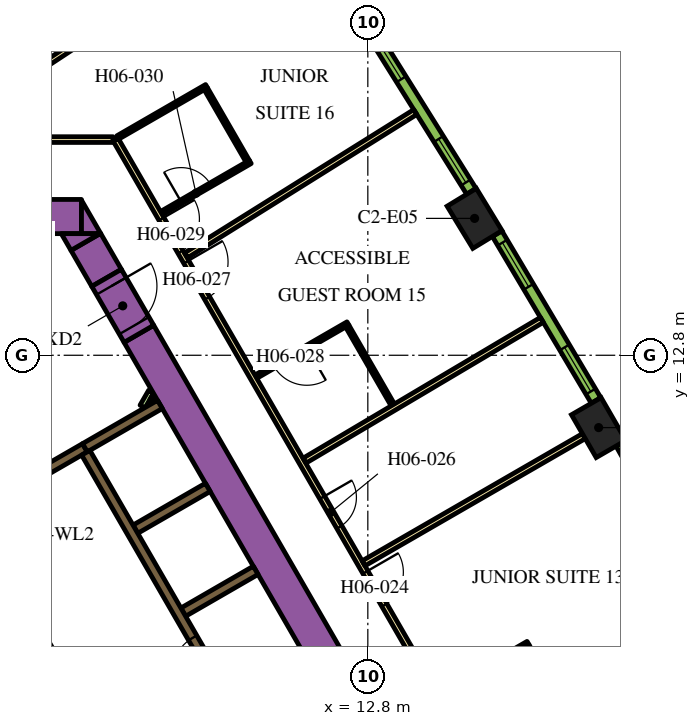
"""IFC4 building model, lengths in metres.
Left out: names, types, materials, properties, quantities, classifications, styles, units other than length and angle.
Written with IfcOpenShell. Run it as: python <this file> out.ifc"""

import sys

from ifc_helpers import new_model, si_unit, direction, frame, frame_2d, origin, origin_2d, place, context, subcontext, project, spatial, polyline, rectangle, outline, extrude, element, fill, save


model = new_model("IFC4")
c1 = context("Model", 3, precision=1e-05, world=origin(), true_north=direction((0.0, 1.0)))
c2 = subcontext(c1, "Body", "Model", "MODEL_VIEW")
j1 = project(units=[si_unit("LENGTHUNIT", "METRE"), si_unit("PLANEANGLEUNIT", "RADIAN")], contexts=[c1])
p1 = place(None, origin())
s1 = spatial("IfcSite", under=j1, at=p1, CompositionType="ELEMENT")
p2 = place(p1, origin())
s2 = spatial("IfcBuilding", under=s1, at=p2, CompositionType="ELEMENT")
p3 = place(p2, frame((0.0, 0.0, 91.5)))
s3 = spatial("IfcBuildingStorey", under=s2, at=p3, CompositionType="ELEMENT", Elevation=91.5)
for number, where, z_axis, x_axis in (
    (1, (18.874, 10.897, 0.0), (0.0, 0.0, 1.0), (-0.5, 0.866, 0.0)),
    (2, (15.609, 16.402, 0.0), (0.0, 0.0, 1.0), (-0.52, 0.854, 0.0)),
):
    element("IfcColumn", number, at=place(p3, frame(where, z_axis=z_axis, x_axis=x_axis)), inside=s3, PredefinedType="COLUMN", context=c2, shape_type="SweptSolid", body=[
        extrude(rectangle(XDim=1.3, YDim=0.9, at=origin_2d()), origin(), (0.0, 0.0, 1.0), 3.9),
    ])
p4 = place(p3, frame((6.776, 13.364, 0.0), z_axis=(0.0, 0.0, 1.0), x_axis=(0.500004177138, -0.8660229921, 0.0)))
e3 = element("IfcWall", 3, at=p4, inside=s3, PredefinedType="SOLIDWALL", context=c2, shape_type="SweptSolid", body=[
    extrude(rectangle(XDim=20.204, YDim=0.9, at=frame_2d((10.102, 0.0))), origin(), (0.0, 0.0, 1.0), 3.9),
])
p5 = place(p3, frame((-4.224, 16.45, 0.0), z_axis=(0.0, 0.0, 1.0), x_axis=(1.0, 0.0, 0.0)))
e4 = element("IfcWall", 4, at=p5, inside=s3, PredefinedType="SOLIDWALL", context=c2, shape_type="SweptSolid", body=[
    extrude(rectangle(XDim=9.488, YDim=0.9, at=frame_2d((4.744, 0.0))), origin(), (0.0, 0.0, 1.0), 3.9),
])
p6 = place(p3, origin())
e5 = element("IfcWall", 5, at=p6, inside=s3, PredefinedType="SOLIDWALL", context=c2, shape_type="SweptSolid", body=[
    extrude(outline(polyline([(5.265, 16.0), (5.265, 16.88), (5.773, 16.0), (5.265, 16.0)])), origin(), (0.0, 0.0, 1.0), 3.9),
])
p7 = place(p3, frame((5.926, 14.836, 0.0), z_axis=(0.0, 0.0, 1.0), x_axis=(-0.500076735116, 0.865981096212, 0.0)))
e6 = element("IfcWall", 6, at=p7, inside=s3, PredefinedType="SOLIDWALL", context=c2, shape_type="SweptSolid", body=[
    extrude(rectangle(XDim=1.094, YDim=0.9, at=frame_2d((0.547, 0.0))), origin(), (0.0, 0.0, 1.0), 3.9),
])
e7 = element("IfcWall", 7, at=p6, inside=s3, PredefinedType="SOLIDWALL", context=c2, shape_type="SweptSolid", body=[
    extrude(outline(polyline([(4.734, 16.0), (5.75, 16.0), (4.988, 15.56), (4.734, 16.0)])), origin(), (0.0, 0.0, 1.0), 3.9),
])
e8 = element("IfcWall", 8, at=p6, inside=s3, PredefinedType="SOLIDWALL", context=c2, shape_type="SweptSolid", body=[
    extrude(outline(polyline([(0.566, 6.725), (0.566, 6.875), (0.566, 6.875), (0.565, 6.875), (0.361, 6.875), (0.035, 7.439), (0.252, 7.564), (0.377, 7.348), (6.552, -3.348), (6.677, -3.564), (6.46, -3.689), (0.448, 6.725), (0.565, 6.725), (0.566, 6.725), (0.566, 6.725)])), origin(), (0.0, 0.0, 1.0), 3.9),
])
p8 = place(p3, frame((4.358, 9.791, 0.0), z_axis=(0.0, 0.0, 1.0), x_axis=(0.866079547155, 0.499906209203, 0.0)))
e9 = element("IfcWall", 9, at=p8, inside=s3, PredefinedType="SOLIDWALL", context=c2, shape_type="SweptSolid", body=[
    extrude(rectangle(XDim=1.15, YDim=0.25, at=frame_2d((0.575, 0.0))), origin(), (0.0, 0.0, 1.0), 3.9),
])
p9 = place(p3, frame((5.356, 10.367, 0.0), z_axis=(0.0, 0.0, 1.0), x_axis=(0.865978535641, 0.50008116922, 0.0)))
e10 = element("IfcWall", 10, at=p9, inside=s3, PredefinedType="SOLIDWALL", context=c2, shape_type="SweptSolid", body=[
    extrude(rectangle(XDim=2.278, YDim=0.25, at=frame_2d((1.139, 0.0))), origin(), (0.0, 0.0, 1.0), 3.9),
])
for number, where, z_axis, x_axis in (
    (11, (6.684, 8.224, 0.0), (0.0, 0.0, 1.0), (0.866, 0.5, 0.0)),
    (12, (7.944, 6.041, 0.0), (0.0, 0.0, 1.0), (0.866, 0.5, 0.0)),
):
    element("IfcWall", number, at=place(p3, frame(where, z_axis=z_axis, x_axis=x_axis)), inside=s3, PredefinedType="SOLIDWALL", context=c2, shape_type="SweptSolid", body=[
        extrude(rectangle(XDim=2.2, YDim=0.25, at=frame_2d((1.1, 0.0))), origin(), (0.0, 0.0, 1.0), 3.9),
    ])
p10 = place(p3, frame((6.872, 11.45, 0.0), z_axis=(0.0, 0.0, 1.0), x_axis=(0.499846793097, 0.866113839764, 0.0)))
e13 = element("IfcWall", 13, at=p10, inside=s3, PredefinedType="PARTITIONING", context=c2, shape_type="SweptSolid", body=[
    extrude(rectangle(XDim=0.453, YDim=0.15, at=frame_2d((0.227, 0.0))), origin(), (0.0, 0.0, 1.0), 2.75),
])
p11 = place(p3, frame((7.131, 11.6, 0.0), z_axis=(0.0, 0.0, 1.0), x_axis=(0.498600033135, 0.866832167699, 0.0)))
e14 = element("IfcWall", 14, at=p11, inside=s3, PredefinedType="PARTITIONING", context=c2, shape_type="SweptSolid", body=[
    extrude(rectangle(XDim=0.107, YDim=0.15, at=frame_2d((0.053, 0.0))), origin(), (0.0, 0.0, 1.0), 2.75),
])
p12 = place(p3, frame((11.553, -0.46, 0.0), z_axis=(0.0, 0.0, 1.0), x_axis=(-0.500006514828, 0.866021642414, 0.0)))
e15 = element("IfcWall", 15, at=p12, inside=s3, PredefinedType="SOLIDWALL", context=c2, shape_type="SweptSolid", body=[
    extrude(rectangle(XDim=12.35, YDim=0.25, at=frame_2d((6.175, 0.0))), origin(), (0.0, 0.0, 1.0), 3.9),
])
p13 = place(p12, frame((0.585, 0.0, 0.0)))
e16 = element("IfcOpeningElement", 16, at=p13, cuts=e15, PredefinedType="OPENING", context=c2, shape_type="SweptSolid", body=[
    extrude(rectangle(XDim=1.1, YDim=2.1, at=frame_2d((0.55, 1.05))), frame((0.0, 0.135, 0.0), z_axis=(0.0, -1.0, 0.0), x_axis=(1.0, 0.0, 0.0)), (0.0, 0.0, 1.0), 0.27),
])
p14 = place(p12, frame((3.105, 0.0, 0.0)))
e17 = element("IfcOpeningElement", 17, at=p14, cuts=e15, PredefinedType="OPENING", context=c2, shape_type="SweptSolid", body=[
    extrude(rectangle(XDim=1.1, YDim=2.1, at=frame_2d((0.55, 1.05))), frame((0.0, 0.135, 0.0), z_axis=(0.0, -1.0, 0.0), x_axis=(1.0, 0.0, 0.0)), (0.0, 0.0, 1.0), 0.27),
])
p15 = place(p12, frame((5.625, 0.0, 0.0)))
e18 = element("IfcOpeningElement", 18, at=p15, cuts=e15, PredefinedType="OPENING", context=c2, shape_type="SweptSolid", body=[
    extrude(rectangle(XDim=1.1, YDim=2.1, at=frame_2d((0.55, 1.05))), frame((0.0, 0.135, 0.0), z_axis=(0.0, -1.0, 0.0), x_axis=(1.0, 0.0, 0.0)), (0.0, 0.0, 1.0), 0.27),
])
p16 = place(p3, frame((8.565, -2.185, 0.0), z_axis=(0.0, 0.0, 1.0), x_axis=(-0.499997954832, 0.866026584559, 0.0)))
e19 = element("IfcWall", 19, at=p16, inside=s3, PredefinedType="SOLIDWALL", context=c2, shape_type="SweptSolid", body=[
    extrude(rectangle(XDim=12.35, YDim=0.25, at=frame_2d((6.175, 0.0))), origin(), (0.0, 0.0, 1.0), 3.9),
])
p17 = place(p16, frame((5.725, 0.0, 0.0)))
e20 = element("IfcOpeningElement", 20, at=p17, cuts=e19, PredefinedType="OPENING", context=c2, shape_type="SweptSolid", body=[
    extrude(rectangle(XDim=0.9, YDim=2.1, at=frame_2d((0.45, 1.05))), frame((0.0, 0.135, 0.0), z_axis=(0.0, -1.0, 0.0), x_axis=(1.0, 0.0, 0.0)), (0.0, 0.0, 1.0), 0.27),
])
p18 = place(p3, frame((5.926, 14.836, 0.0), z_axis=(0.0, 0.0, 1.0), x_axis=(0.500062241894, -0.865989465428, 0.0)))
e21 = element("IfcWall", 21, at=p18, inside=s3, PredefinedType="SOLIDWALL", context=c2, shape_type="SweptSolid", body=[
    extrude(rectangle(XDim=1.7, YDim=0.9, at=frame_2d((0.85, 0.0))), origin(), (0.0, 0.0, 1.0), 3.9),
])
p19 = place(p18, frame((0.25, 0.0, 0.0)))
e22 = element("IfcOpeningElement", 22, at=p19, cuts=e21, PredefinedType="OPENING", context=c2, shape_type="SweptSolid", body=[
    extrude(rectangle(XDim=1.2, YDim=2.1, at=frame_2d((0.6, 1.05))), frame((0.0, 0.46, 0.0), z_axis=(0.0, -1.0, 0.0), x_axis=(1.0, 0.0, 0.0)), (0.0, 0.0, 1.0), 0.92),
])
p20 = place(p3, frame((6.163, 18.475, 0.0), z_axis=(0.0, 0.0, 1.0), x_axis=(0.500001317485, -0.866024643133, 0.0)))
e23 = element("IfcWall", 23, at=p20, inside=s3, PredefinedType="PARTITIONING", context=c2, shape_type="SweptSolid", body=[
    extrude(rectangle(XDim=25.767, YDim=0.15, at=frame_2d((12.883, 0.0))), origin(), (0.0, 0.0, 1.0), 2.75),
])
p21 = place(p20, frame((24.241, 0.0, 0.0)))
e24 = element("IfcOpeningElement", 24, at=p21, cuts=e23, PredefinedType="OPENING", context=c2, shape_type="SweptSolid", body=[
    extrude(rectangle(XDim=1.0, YDim=2.1, at=frame_2d((0.5, 1.05))), frame((0.0, 0.085, 0.0), z_axis=(0.0, -1.0, 0.0), x_axis=(1.0, 0.0, 0.0)), (0.0, 0.0, 1.0), 0.17),
])
p22 = place(p20, frame((13.144, 0.0, 0.0)))
e25 = element("IfcOpeningElement", 25, at=p22, cuts=e23, PredefinedType="OPENING", context=c2, shape_type="SweptSolid", body=[
    extrude(rectangle(XDim=1.0, YDim=2.1, at=frame_2d((0.5, 1.05))), frame((0.0, 0.085, 0.0), z_axis=(0.0, -1.0, 0.0), x_axis=(1.0, 0.0, 0.0)), (0.0, 0.0, 1.0), 0.17),
])
p23 = place(p20, frame((10.874, 0.0, 0.0)))
e26 = element("IfcOpeningElement", 26, at=p23, cuts=e23, PredefinedType="OPENING", context=c2, shape_type="SweptSolid", body=[
    extrude(rectangle(XDim=0.9, YDim=2.1, at=frame_2d((0.45, 1.05))), frame((0.0, 0.085, 0.0), z_axis=(0.0, -1.0, 0.0), x_axis=(1.0, 0.0, 0.0)), (0.0, 0.0, 1.0), 0.17),
])
p24 = place(p20, frame((3.718, 0.0, 0.0)))
e27 = element("IfcOpeningElement", 27, at=p24, cuts=e23, PredefinedType="OPENING", context=c2, shape_type="SweptSolid", body=[
    extrude(rectangle(XDim=1.1, YDim=2.1, at=frame_2d((0.55, 1.05))), frame((0.0, 0.085, 0.0), z_axis=(0.0, -1.0, 0.0), x_axis=(1.0, 0.0, 0.0)), (0.0, 0.0, 1.0), 0.17),
])
p25 = place(p20, frame((2.411, 0.0, 0.0)))
e28 = element("IfcOpeningElement", 28, at=p25, cuts=e23, PredefinedType="OPENING", context=c2, shape_type="SweptSolid", body=[
    extrude(rectangle(XDim=1.0, YDim=2.1, at=frame_2d((0.5, 1.05))), frame((0.0, 0.085, 0.0), z_axis=(0.0, -1.0, 0.0), x_axis=(1.0, 0.0, 0.0)), (0.0, 0.0, 1.0), 0.17),
])
p26 = place(p3, frame((0.825, 18.475, 0.0), z_axis=(0.0, 0.0, 1.0), x_axis=(1.0, 0.0, 0.0)))
e29 = element("IfcWall", 29, at=p26, inside=s3, PredefinedType="PARTITIONING", context=c2, shape_type="SweptSolid", body=[
    extrude(rectangle(XDim=5.268, YDim=0.15, at=frame_2d((2.634, 0.0))), origin(), (0.0, 0.0, 1.0), 2.75),
])
p27 = place(p3, frame((10.592, 24.589, 0.0), z_axis=(0.0, 0.0, 1.0), x_axis=(-0.835337323748, -0.549737715236, 0.0)))
e30 = element("IfcWall", 30, at=p27, inside=s3, PredefinedType="PARTITIONING", context=c2, shape_type="SweptSolid", body=[
    extrude(rectangle(XDim=10.875, YDim=0.15, at=frame_2d((5.438, 0.0))), origin(), (0.0, 0.0, 1.0), 2.75),
])
p28 = place(p3, frame((14.049, 19.2, 0.0), z_axis=(0.0, 0.0, 1.0), x_axis=(-0.847955867271, -0.530066832731, 0.0)))
e31 = element("IfcWall", 31, at=p28, inside=s3, PredefinedType="PARTITIONING", context=c2, shape_type="SweptSolid", body=[
    extrude(rectangle(XDim=7.111, YDim=0.15, at=frame_2d((3.556, 0.0))), origin(), (0.0, 0.0, 1.0), 2.75),
])
p29 = place(p3, frame((17.379, 13.731, 0.0), z_axis=(0.0, 0.0, 1.0), x_axis=(-0.860132461691, -0.510070728768, 0.0)))
e32 = element("IfcWall", 32, at=p29, inside=s3, PredefinedType="PARTITIONING", context=c2, shape_type="SweptSolid", body=[
    extrude(rectangle(XDim=7.257, YDim=0.15, at=frame_2d((3.628, 0.0))), origin(), (0.0, 0.0, 1.0), 2.75),
])
p30 = place(p3, frame((18.484, 10.672, 0.0), z_axis=(0.0, 0.0, 1.0), x_axis=(-0.866019162053, -0.50001081084, 0.0)))
e33 = element("IfcWall", 33, at=p30, inside=s3, PredefinedType="PARTITIONING", context=c2, shape_type="SweptSolid", body=[
    extrude(rectangle(XDim=6.694, YDim=0.15, at=frame_2d((3.347, 0.0))), origin(), (0.0, 0.0, 1.0), 2.75),
])
p31 = place(p3, frame((21.614, 5.102, 0.0), z_axis=(0.0, 0.0, 1.0), x_axis=(-0.877484555087, -0.479604895287, 0.0)))
e34 = element("IfcWall", 34, at=p31, inside=s3, PredefinedType="PARTITIONING", context=c2, shape_type="SweptSolid", body=[
    extrude(rectangle(XDim=6.611, YDim=0.15, at=frame_2d((3.306, 0.0))), origin(), (0.0, 0.0, 1.0), 2.75),
])
p32 = place(p3, frame((17.016, 5.228, 0.0), z_axis=(0.0, 0.0, 1.0), x_axis=(-0.86599734893, -0.500048589285, 0.0)))
e35 = element("IfcWall", 35, at=p32, inside=s3, PredefinedType="PARTITIONING", context=c2, shape_type="SweptSolid", body=[
    extrude(rectangle(XDim=2.7, YDim=0.1, at=frame_2d((1.35, 0.0))), origin(), (0.0, 0.0, 1.0), 2.75),
])
p33 = place(p32, frame((1.2, 0.0, 0.0)))
e36 = element("IfcOpeningElement", 36, at=p33, cuts=e35, PredefinedType="OPENING", context=c2, shape_type="SweptSolid", body=[
    extrude(rectangle(XDim=0.9, YDim=2.1, at=frame_2d((0.45, 1.05))), frame((0.0, 0.06, 0.0), z_axis=(0.0, -1.0, 0.0), x_axis=(1.0, 0.0, 0.0)), (0.0, 0.0, 1.0), 0.12),
])
p34 = place(p3, frame((16.997, 5.16, 0.0), z_axis=(0.0, 0.0, 1.0), x_axis=(0.500011965869, -0.866018495177, 0.0)))
e37 = element("IfcWall", 37, at=p34, inside=s3, PredefinedType="PARTITIONING", context=c2, shape_type="SweptSolid", body=[
    extrude(rectangle(XDim=2.19, YDim=0.1, at=frame_2d((1.095, 0.0))), origin(), (0.0, 0.0, 1.0), 2.75),
])
p35 = place(p3, frame((12.277, 13.635, 0.0), z_axis=(0.0, 0.0, 1.0), x_axis=(-0.866034573852, -0.49998411664, 0.0)))
e38 = element("IfcWall", 38, at=p35, inside=s3, PredefinedType="PARTITIONING", context=c2, shape_type="SweptSolid", body=[
    extrude(rectangle(XDim=2.8, YDim=0.1, at=frame_2d((1.4, 0.0))), origin(), (0.0, 0.0, 1.0), 2.75),
])
p36 = place(p35, frame((1.25, 0.0, 0.0)))
e39 = element("IfcOpeningElement", 39, at=p36, cuts=e38, PredefinedType="OPENING", context=c2, shape_type="SweptSolid", body=[
    extrude(rectangle(XDim=1.0, YDim=2.1, at=frame_2d((0.5, 1.05))), frame((0.0, 0.06, 0.0), z_axis=(0.0, -1.0, 0.0), x_axis=(1.0, 0.0, 0.0)), (0.0, 0.0, 1.0), 0.12),
])
p37 = place(p3, frame((12.259, 13.567, 0.0), z_axis=(0.0, 0.0, 1.0), x_axis=(0.500017192868, -0.86601547725, 0.0)))
e40 = element("IfcWall", 40, at=p37, inside=s3, PredefinedType="PARTITIONING", context=c2, shape_type="SweptSolid", body=[
    extrude(rectangle(XDim=2.39, YDim=0.1, at=frame_2d((1.195, 0.0))), origin(), (0.0, 0.0, 1.0), 2.75),
])
p38 = place(p3, frame((7.368, 16.538, 0.0), z_axis=(0.0, 0.0, 1.0), x_axis=(0.866036505625, 0.499980770555, 0.0)))
e41 = element("IfcWall", 41, at=p38, inside=s3, PredefinedType="PARTITIONING", context=c2, shape_type="SweptSolid", body=[
    extrude(rectangle(XDim=2.7, YDim=0.1, at=frame_2d((1.35, 0.0))), origin(), (0.0, 0.0, 1.0), 2.75),
])
p39 = place(p38, frame((0.6, 0.0, 0.0)))
e42 = element("IfcOpeningElement", 42, at=p39, cuts=e41, PredefinedType="OPENING", context=c2, shape_type="SweptSolid", body=[
    extrude(rectangle(XDim=0.9, YDim=2.1, at=frame_2d((0.45, 1.05))), frame((0.0, 0.06, 0.0), z_axis=(0.0, -1.0, 0.0), x_axis=(1.0, 0.0, 0.0)), (0.0, 0.0, 1.0), 0.12),
])
p40 = place(p3, frame((9.638, 17.906, 0.0), z_axis=(0.0, 0.0, 1.0), x_axis=(-0.50002983664, 0.866008176907, 0.0)))
e43 = element("IfcWall", 43, at=p40, inside=s3, PredefinedType="PARTITIONING", context=c2, shape_type="SweptSolid", body=[
    extrude(rectangle(XDim=2.2, YDim=0.1, at=frame_2d((1.1, 0.0))), origin(), (0.0, 0.0, 1.0), 2.75),
])
p41 = place(p3, frame((6.218, 18.53, 0.0), z_axis=(0.0, 0.0, 1.0), x_axis=(0.86599734893, 0.500048589285, 0.0)))
e44 = element("IfcWall", 44, at=p41, inside=s3, PredefinedType="PARTITIONING", context=c2, shape_type="SweptSolid", body=[
    extrude(rectangle(XDim=2.7, YDim=0.1, at=frame_2d((1.35, 0.0))), origin(), (0.0, 0.0, 1.0), 2.75),
])
p42 = place(p3, frame((21.956, 6.033, 0.0), z_axis=(0.0, 0.0, 1.0), x_axis=(-0.48983164787, 0.87181704316, 0.0)))
e45 = element("IfcWall", 45, at=p42, inside=s3, PredefinedType="SOLIDWALL", context=c2, shape_type="SweptSolid", body=[
    extrude(rectangle(XDim=5.1, YDim=0.29, at=frame_2d((2.55, 0.0))), origin(), (0.0, 0.0, 1.0), 3.65),
])
p43 = place(p42, frame((0.273, 0.0, 0.9)))
e46 = element("IfcOpeningElement", 46, at=p43, cuts=e45, PredefinedType="OPENING", context=c2, shape_type="SweptSolid", body=[
    extrude(rectangle(XDim=1.35, YDim=2.15, at=frame_2d((0.675, 1.075))), frame((0.0, 0.155, 0.0), z_axis=(0.0, -1.0, 0.0), x_axis=(1.0, 0.0, 0.0)), (0.0, 0.0, 1.0), 0.31),
])
p44 = place(p42, frame((3.478, 0.0, 0.9)))
e47 = element("IfcOpeningElement", 47, at=p44, cuts=e45, PredefinedType="OPENING", context=c2, shape_type="SweptSolid", body=[
    extrude(rectangle(XDim=1.35, YDim=2.15, at=frame_2d((0.675, 1.075))), frame((0.0, 0.155, 0.0), z_axis=(0.0, -1.0, 0.0), x_axis=(1.0, 0.0, 0.0)), (0.0, 0.0, 1.0), 0.31),
])
p45 = place(p3, frame((18.805, 11.611, 0.0), z_axis=(0.0, 0.0, 1.0), x_axis=(-0.510054281659, 0.860142214847, 0.0)))
e48 = element("IfcWall", 48, at=p45, inside=s3, PredefinedType="SOLIDWALL", context=c2, shape_type="SweptSolid", body=[
    extrude(rectangle(XDim=5.101, YDim=0.29, at=frame_2d((2.55, 0.0))), origin(), (0.0, 0.0, 1.0), 3.65),
])
p46 = place(p45, frame((0.273, 0.0, 0.9)))
e49 = element("IfcOpeningElement", 49, at=p46, cuts=e48, PredefinedType="OPENING", context=c2, shape_type="SweptSolid", body=[
    extrude(rectangle(XDim=1.35, YDim=2.15, at=frame_2d((0.675, 1.075))), frame((0.0, 0.155, 0.0), z_axis=(0.0, -1.0, 0.0), x_axis=(1.0, 0.0, 0.0)), (0.0, 0.0, 1.0), 0.31),
])
p47 = place(p45, frame((3.478, 0.0, 0.9)))
e50 = element("IfcOpeningElement", 50, at=p47, cuts=e48, PredefinedType="OPENING", context=c2, shape_type="SweptSolid", body=[
    extrude(rectangle(XDim=1.35, YDim=2.15, at=frame_2d((0.675, 1.075))), frame((0.0, 0.155, 0.0), z_axis=(0.0, -1.0, 0.0), x_axis=(1.0, 0.0, 0.0)), (0.0, 0.0, 1.0), 0.31),
])
p48 = place(p3, frame((15.524, 17.114, 0.0), z_axis=(0.0, 0.0, 1.0), x_axis=(-0.530072082134, 0.847952585787, 0.0)))
e51 = element("IfcWall", 51, at=p48, inside=s3, PredefinedType="SOLIDWALL", context=c2, shape_type="SweptSolid", body=[
    extrude(rectangle(XDim=5.1, YDim=0.29, at=frame_2d((2.55, 0.0))), origin(), (0.0, 0.0, 1.0), 3.65),
])
p49 = place(p48, frame((0.273, 0.0, 0.9)))
e52 = element("IfcOpeningElement", 52, at=p49, cuts=e51, PredefinedType="OPENING", context=c2, shape_type="SweptSolid", body=[
    extrude(rectangle(XDim=1.35, YDim=2.15, at=frame_2d((0.675, 1.075))), frame((0.0, 0.155, 0.0), z_axis=(0.0, -1.0, 0.0), x_axis=(1.0, 0.0, 0.0)), (0.0, 0.0, 1.0), 0.31),
])
p50 = place(p48, frame((3.478, 0.0, 0.9)))
e53 = element("IfcOpeningElement", 53, at=p50, cuts=e51, PredefinedType="OPENING", context=c2, shape_type="SweptSolid", body=[
    extrude(rectangle(XDim=1.35, YDim=2.15, at=frame_2d((0.675, 1.075))), frame((0.0, 0.155, 0.0), z_axis=(0.0, -1.0, 0.0), x_axis=(1.0, 0.0, 0.0)), (0.0, 0.0, 1.0), 0.31),
])
p51 = place(p15, origin())
e54 = element("IfcDoor", 54, at=p51, inside=s3, OperationType="DOUBLE_DOOR_SLIDING", PredefinedType="DOOR", context=c2, shape_type="SweptSolid", body=[
    extrude(rectangle(XDim=1.1, YDim=2.1, at=frame_2d((0.55, 1.05))), frame((0.0, 0.025, 0.0), z_axis=(0.0, -1.0, 0.0), x_axis=(1.0, 0.0, 0.0)), (0.0, 0.0, 1.0), 0.05),
])
fill(e18, e54)
p52 = place(p19, origin())
e55 = element("IfcDoor", 55, at=p52, inside=s3, OperationType="SINGLE_SWING_LEFT", PredefinedType="DOOR", context=c2, shape_type="SweptSolid", body=[
    extrude(rectangle(XDim=1.2, YDim=2.1, at=frame_2d((0.6, 1.05))), frame((0.0, 0.025, 0.0), z_axis=(0.0, -1.0, 0.0), x_axis=(1.0, 0.0, 0.0)), (0.0, 0.0, 1.0), 0.05),
])
fill(e22, e55)
p53 = place(p22, origin())
e56 = element("IfcDoor", 56, at=p53, inside=s3, OperationType="SINGLE_SWING_LEFT", PredefinedType="DOOR", context=c2, shape_type="SweptSolid", body=[
    extrude(rectangle(XDim=1.0, YDim=2.1, at=frame_2d((0.5, 1.05))), frame((0.0, 0.025, 0.0), z_axis=(0.0, -1.0, 0.0), x_axis=(1.0, 0.0, 0.0)), (0.0, 0.0, 1.0), 0.05),
])
fill(e25, e56)
p54 = place(p23, origin())
e57 = element("IfcDoor", 57, at=p54, inside=s3, OperationType="SINGLE_SWING_RIGHT", PredefinedType="DOOR", context=c2, shape_type="SweptSolid", body=[
    extrude(rectangle(XDim=0.9, YDim=2.1, at=frame_2d((0.45, 1.05))), frame((0.0, 0.025, 0.0), z_axis=(0.0, -1.0, 0.0), x_axis=(1.0, 0.0, 0.0)), (0.0, 0.0, 1.0), 0.05),
])
fill(e26, e57)
p55 = place(p24, origin())
e58 = element("IfcDoor", 58, at=p55, inside=s3, OperationType="SINGLE_SWING_LEFT", PredefinedType="DOOR", context=c2, shape_type="SweptSolid", body=[
    extrude(rectangle(XDim=1.1, YDim=2.1, at=frame_2d((0.55, 1.05))), frame((0.0, 0.025, 0.0), z_axis=(0.0, -1.0, 0.0), x_axis=(1.0, 0.0, 0.0)), (0.0, 0.0, 1.0), 0.05),
])
fill(e27, e58)
p56 = place(p36, origin())
e59 = element("IfcDoor", 59, at=p56, inside=s3, OperationType="SINGLE_SWING_RIGHT", PredefinedType="DOOR", context=c2, shape_type="SweptSolid", body=[
    extrude(rectangle(XDim=1.0, YDim=2.1, at=frame_2d((0.5, 1.05))), frame((0.0, 0.025, 0.0), z_axis=(0.0, -1.0, 0.0), x_axis=(1.0, 0.0, 0.0)), (0.0, 0.0, 1.0), 0.05),
])
fill(e39, e59)
p57 = place(p25, origin())
e60 = element("IfcDoor", 60, at=p57, inside=s3, OperationType="SINGLE_SWING_RIGHT", PredefinedType="DOOR", context=c2, shape_type="SweptSolid", body=[
    extrude(rectangle(XDim=1.0, YDim=2.1, at=frame_2d((0.5, 1.05))), frame((0.0, 0.025, 0.0), z_axis=(0.0, -1.0, 0.0), x_axis=(1.0, 0.0, 0.0)), (0.0, 0.0, 1.0), 0.05),
])
fill(e28, e60)
p58 = place(p39, origin())
e61 = element("IfcDoor", 61, at=p58, inside=s3, OperationType="SINGLE_SWING_LEFT", PredefinedType="DOOR", context=c2, shape_type="SweptSolid", body=[
    extrude(rectangle(XDim=0.9, YDim=2.1, at=frame_2d((0.45, 1.05))), frame((0.0, 0.025, 0.0), z_axis=(0.0, -1.0, 0.0), x_axis=(1.0, 0.0, 0.0)), (0.0, 0.0, 1.0), 0.05),
])
fill(e42, e61)
p59 = place(p46, origin())
e62 = element("IfcWindow", 62, at=p59, inside=s3, PartitioningType="DOUBLE_PANEL_VERTICAL", PredefinedType="WINDOW", context=c2, shape_type="SweptSolid", body=[
    extrude(rectangle(XDim=1.35, YDim=2.15, at=frame_2d((0.675, 1.075))), frame((0.0, 0.015, 0.0), z_axis=(0.0, -1.0, 0.0), x_axis=(1.0, 0.0, 0.0)), (0.0, 0.0, 1.0), 0.06),
])
fill(e49, e62)
p60 = place(p47, origin())
e63 = element("IfcWindow", 63, at=p60, inside=s3, PartitioningType="DOUBLE_PANEL_VERTICAL", PredefinedType="WINDOW", context=c2, shape_type="SweptSolid", body=[
    extrude(rectangle(XDim=1.35, YDim=2.15, at=frame_2d((0.675, 1.075))), frame((0.0, 0.015, 0.0), z_axis=(0.0, -1.0, 0.0), x_axis=(1.0, 0.0, 0.0)), (0.0, 0.0, 1.0), 0.06),
])
fill(e50, e63)
p61 = place(p49, origin())
e64 = element("IfcWindow", 64, at=p61, inside=s3, PartitioningType="DOUBLE_PANEL_VERTICAL", PredefinedType="WINDOW", context=c2, shape_type="SweptSolid", body=[
    extrude(rectangle(XDim=1.35, YDim=2.15, at=frame_2d((0.675, 1.075))), frame((0.0, 0.015, 0.0), z_axis=(0.0, -1.0, 0.0), x_axis=(1.0, 0.0, 0.0)), (0.0, 0.0, 1.0), 0.06),
])
fill(e52, e64)
p62 = place(p50, origin())
e65 = element("IfcWindow", 65, at=p62, inside=s3, PartitioningType="DOUBLE_PANEL_VERTICAL", PredefinedType="WINDOW", context=c2, shape_type="SweptSolid", body=[
    extrude(rectangle(XDim=1.35, YDim=2.15, at=frame_2d((0.675, 1.075))), frame((0.0, 0.015, 0.0), z_axis=(0.0, -1.0, 0.0), x_axis=(1.0, 0.0, 0.0)), (0.0, 0.0, 1.0), 0.06),
])
fill(e53, e65)
save(model, sys.argv[1])
